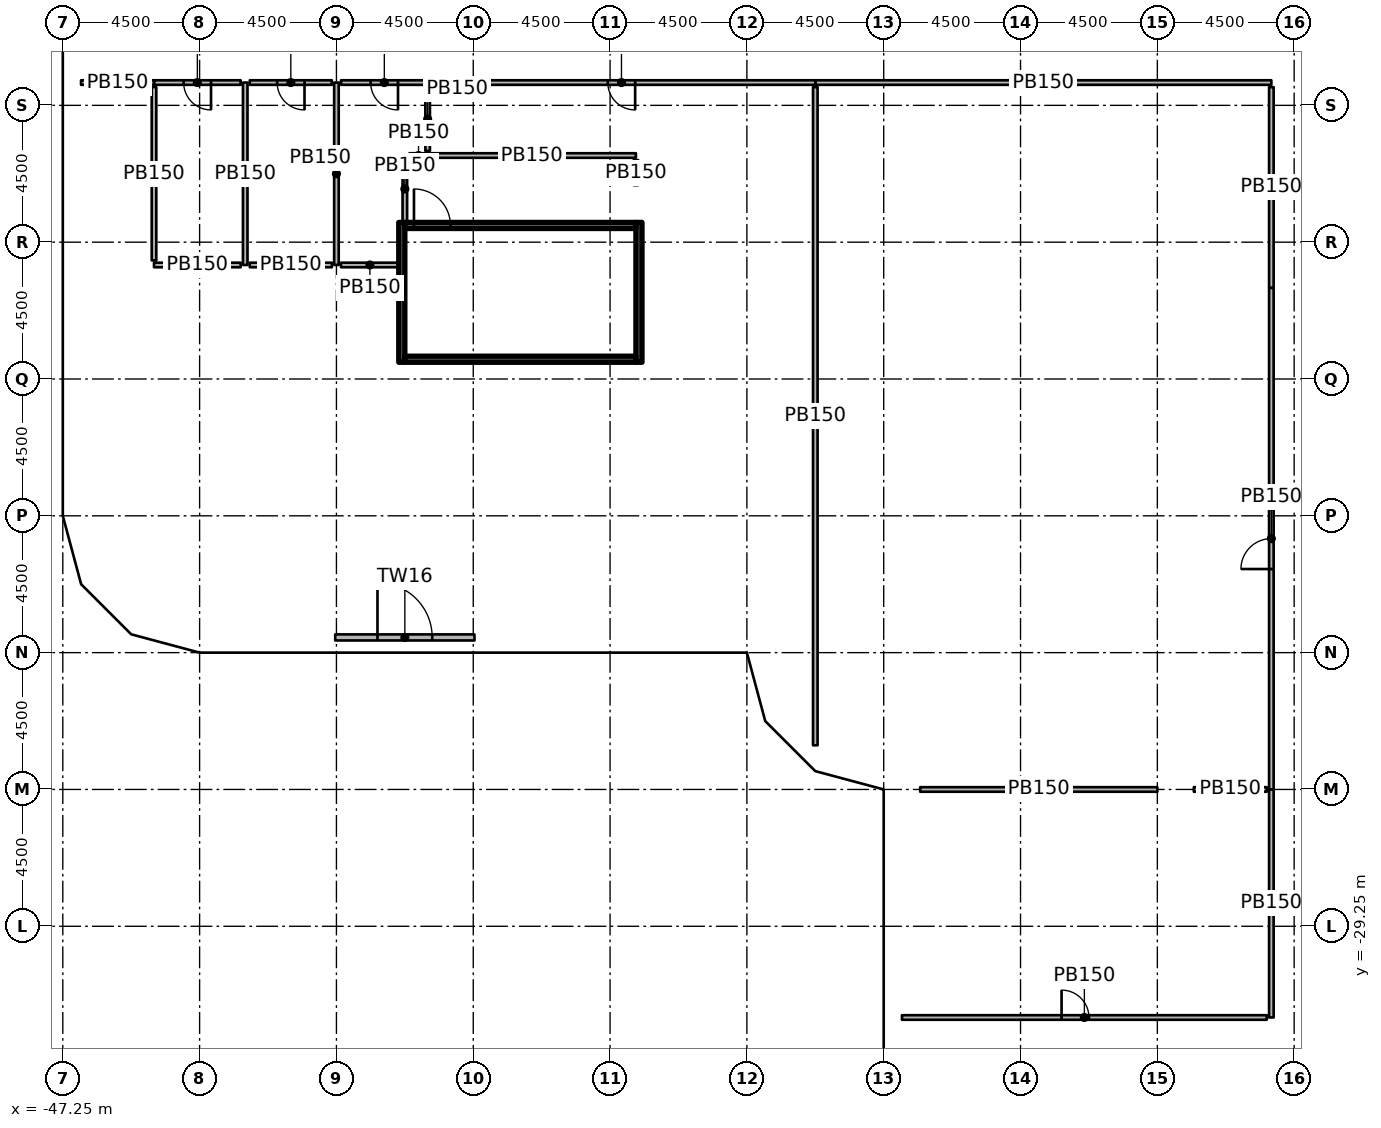
"""IFC4 building model, lengths in metres.
Left out: names, types, materials, properties, quantities, classifications, styles, units other than length and angle.
Written with IfcOpenShell. Run it as: python <this file> out.ifc"""

import sys

from ifc_helpers import new_model, si_unit, direction, frame, frame_2d, origin, origin_2d, place, context, subcontext, project, spatial, rectangle, extrude, element, fill, save


model = new_model("IFC4")
c1 = context("Model", 3, precision=1e-05, world=origin(), true_north=direction((0.0, 1.0)))
c2 = subcontext(c1, "Body", "Model", "MODEL_VIEW")
j1 = project(units=[si_unit("LENGTHUNIT", "METRE"), si_unit("PLANEANGLEUNIT", "RADIAN")], contexts=[c1])
p1 = place(None, origin())
s1 = spatial("IfcSite", under=j1, at=p1, CompositionType="ELEMENT")
p2 = place(p1, origin())
s2 = spatial("IfcBuilding", under=s1, at=p2, CompositionType="ELEMENT")
p3 = place(p2, frame((0.0, 0.0, 12.0)))
s3 = spatial("IfcBuildingStorey", under=s2, at=p3, CompositionType="ELEMENT", Elevation=12.0)
for number, where, z_axis, x_axis in (
    (1, (-46.47, -15.75, 0.0), (0.0, 0.0, 1.0), (1.0, 0.0, 0.0)),
    (2, (-46.65, -2.25, 0.0), (0.0, 0.0, 1.0), (1.0, 0.0, 0.0)),
    (3, (-42.75, -19.47, 0.0), (0.0, 0.0, 1.0), (1.0, 0.0, 0.0)),
    (4, (-33.75, -15.15, 0.0), (0.0, 0.0, 1.0), (1.0, 0.0, 0.0)),
    (5, (-33.11, -2.25, 0.0), (0.0, 0.0, 1.0), (1.0, 0.0, 0.0)),
    (6, (-29.25, -19.65, 0.0), (0.0, 0.0, 1.0), (1.0, 0.0, 0.0)),
    (7, (-28.908, -5.475, 0.0), (0.0, 0.0, 1.0), (1.0, 0.0, 0.0)),
    (8, (-24.15, -19.65, 0.0), (0.0, 0.0, 1.0), (1.0, 0.0, 0.0)),
    (9, (-24.75, -10.65, 0.0), (0.0, 0.0, 1.0), (1.0, 0.0, 0.0)),
    (10, (-24.75, -6.25, 0.0), (0.0, 0.0, 1.0), (1.0, 0.0, 0.0)),
    (11, (-19.65, -29.25, 0.0), (0.0, 0.0, 1.0), (1.0, 0.0, 0.0)),
    (12, (-19.65, -24.15, 0.0), (0.0, 0.0, 1.0), (1.0, 0.0, 0.0)),
    (13, (-19.65, -15.15, 0.0), (0.0, 0.0, 1.0), (1.0, 0.0, 0.0)),
    (14, (-20.25, -6.11, 0.0), (0.0, 0.0, 1.0), (1.0, 0.0, 0.0)),
    (15, (-15.15, -33.75, 0.0), (0.0, 0.0, 1.0), (1.0, 0.0, 0.0)),
    (16, (-15.15, -19.65, 0.0), (0.0, 0.0, 1.0), (1.0, 0.0, 0.0)),
    (17, (-15.15, -10.65, 0.0), (0.0, 0.0, 1.0), (1.0, 0.0, 0.0)),
    (18, (-15.75, -6.25, 0.0), (0.0, 0.0, 1.0), (1.0, 0.0, 0.0)),
    (19, (-10.65, -24.75, 0.0), (0.0, 0.0, 1.0), (1.0, 0.0, 0.0)),
    (20, (-10.65, -15.15, 0.0), (0.0, 0.0, 1.0), (1.0, 0.0, 0.0)),
    (21, (-10.75, -6.25, 0.0), (0.0, 0.0, 1.0), (1.0, 0.0, 0.0)),
    (22, (-6.25, -26.9, 0.0), (0.0, 0.0, 1.0), (1.0, 0.0, 0.0)),
    (23, (-6.25, -24.65, 0.0), (0.0, 0.0, 1.0), (1.0, 0.0, 0.0)),
    (24, (-6.25, -20.25, 0.0), (0.0, 0.0, 1.0), (1.0, 0.0, 0.0)),
    (25, (-6.25, -15.75, 0.0), (0.0, 0.0, 1.0), (1.0, 0.0, 0.0)),
    (26, (-6.25, -10.75, 0.0), (0.0, 0.0, 1.0), (1.0, 0.0, 0.0)),
    (27, (-6.25, -6.25, 0.0), (0.0, 0.0, 1.0), (1.0, 0.0, 0.0)),
):
    element("IfcColumn", number, at=place(p3, frame(where, z_axis=z_axis, x_axis=x_axis)), inside=s3, PredefinedType="COLUMN", context=c2, shape_type="SweptSolid", body=[
        extrude(rectangle(XDim=1.2, YDim=1.2, at=origin_2d()), origin(), (0.0, 0.0, 1.0), 4.55),
    ])
p4 = place(p3, frame((-38.29, -19.75, 0.0), z_axis=(0.0, 0.0, 1.0), x_axis=(1.0, 0.0, 0.0)))
e28 = element("IfcWall", 28, at=p4, inside=s3, PredefinedType="SOLIDWALL", context=c2, shape_type="SweptSolid", body=[
    extrude(rectangle(XDim=4.58, YDim=0.2, at=frame_2d((2.29, 0.0))), origin(), (0.0, 0.0, 1.0), 4.55),
])
p5 = place(p4, frame((1.39, 0.0, 0.0)))
e29 = element("IfcOpeningElement", 29, at=p5, cuts=e28, PredefinedType="OPENING", context=c2, shape_type="SweptSolid", body=[
    extrude(rectangle(XDim=1.8, YDim=2.4, at=frame_2d((0.9, 1.2))), frame((0.0, 0.11, 0.0), z_axis=(0.0, -1.0, 0.0), x_axis=(1.0, 0.0, 0.0)), (0.0, 0.0, 1.0), 0.22),
])
for number, where, z_axis, x_axis in (
    (30, (-36.1, -10.7, 0.0), (0.0, 0.0, 1.0), (0.0, 1.0, 0.0)),
    (31, (-28.3, -10.7, 0.0), (0.0, 0.0, 1.0), (0.0, 1.0, 0.0)),
):
    element("IfcWall", number, at=place(p3, frame(where, z_axis=z_axis, x_axis=x_axis)), inside=s3, PredefinedType="SHEAR", context=c2, shape_type="SweptSolid", body=[
        extrude(rectangle(XDim=4.6, YDim=0.2, at=frame_2d((2.3, 0.0))), origin(), (0.0, 0.0, 1.0), 4.55),
    ])
p6 = place(p3, frame((-36.0, -10.6, 0.0), z_axis=(0.0, 0.0, 1.0), x_axis=(1.0, 0.0, 0.0)))
e32 = element("IfcWall", 32, at=p6, inside=s3, PredefinedType="SHEAR", context=c2, shape_type="SweptSolid", body=[
    extrude(rectangle(XDim=7.6, YDim=0.2, at=frame_2d((3.8, 0.0))), origin(), (0.0, 0.0, 1.0), 4.55),
])
p7 = place(p3, frame((-36.0, -6.2, 0.0), z_axis=(0.0, 0.0, 1.0), x_axis=(1.0, 0.0, 0.0)))
e33 = element("IfcWall", 33, at=p7, inside=s3, PredefinedType="SHEAR", context=c2, shape_type="SweptSolid", body=[
    extrude(rectangle(XDim=7.6, YDim=0.2, at=frame_2d((3.8, 0.0))), origin(), (0.0, 0.0, 1.0), 4.55),
])
p8 = place(p7, frame((0.3, 0.0, 0.0)))
e34 = element("IfcOpeningElement", 34, at=p8, cuts=e33, PredefinedType="OPENING", context=c2, shape_type="SweptSolid", body=[
    extrude(rectangle(XDim=1.2, YDim=2.1, at=frame_2d((0.6, 1.05))), frame((0.0, 0.11, 0.0), z_axis=(0.0, -1.0, 0.0), x_axis=(1.0, 0.0, 0.0)), (0.0, 0.0, 1.0), 0.22),
])
p9 = place(p3, frame((-36.0, -6.1, 0.0), z_axis=(0.0, 0.0, 1.0), x_axis=(0.0, 1.0, 0.0)))
e35 = element("IfcWall", 35, at=p9, inside=s3, PredefinedType="PARTITIONING", context=c2, shape_type="SweptSolid", body=[
    extrude(rectangle(XDim=2.2, YDim=0.15, at=frame_2d((1.1, 0.0))), origin(), (0.0, 0.0, 1.0), 4.55),
])
p10 = place(p3, frame((-35.85, -3.9, 0.0), z_axis=(0.0, 0.0, 1.0), x_axis=(1.0, 0.0, 0.0)))
e36 = element("IfcWall", 36, at=p10, inside=s3, PredefinedType="PARTITIONING", context=c2, shape_type="SweptSolid", body=[
    extrude(rectangle(XDim=0.6, YDim=0.15, at=frame_2d((0.3, 0.0))), origin(), (0.0, 0.0, 1.0), 4.55),
])
p11 = place(p3, frame((-35.25, -3.9, 0.0), z_axis=(0.0, 0.0, 1.0), x_axis=(1.0, 0.0, 0.0)))
e37 = element("IfcWall", 37, at=p11, inside=s3, PredefinedType="PARTITIONING", context=c2, shape_type="SweptSolid", body=[
    extrude(rectangle(XDim=6.85, YDim=0.15, at=frame_2d((3.425, 0.0))), origin(), (0.0, 0.0, 1.0), 4.55),
])
p12 = place(p3, frame((-28.4, -4.05, 0.0), z_axis=(0.0, 0.0, 1.0), x_axis=(0.0, -1.0, 0.0)))
e38 = element("IfcWall", 38, at=p12, inside=s3, PredefinedType="PARTITIONING", context=c2, shape_type="SweptSolid", body=[
    extrude(rectangle(XDim=0.825, YDim=0.15, at=frame_2d((0.413, 0.0))), origin(), (0.0, 0.0, 1.0), 4.55),
])
p13 = place(p3, frame((-41.25, -1.5, 0.0), z_axis=(0.0, 0.0, 1.0), x_axis=(0.0, -1.0, 0.0)))
e39 = element("IfcWall", 39, at=p13, inside=s3, PredefinedType="PARTITIONING", context=c2, shape_type="SweptSolid", body=[
    extrude(rectangle(XDim=6.0, YDim=0.15, at=frame_2d((3.0, 0.0))), origin(), (0.0, 0.0, 1.0), 4.55),
])
p14 = place(p3, frame((-41.4, -1.5, 0.0), z_axis=(0.0, 0.0, 1.0), x_axis=(-1.0, 0.0, 0.0)))
e40 = element("IfcWall", 40, at=p14, inside=s3, PredefinedType="PARTITIONING", context=c2, shape_type="SweptSolid", body=[
    extrude(rectangle(XDim=2.85, YDim=0.15, at=frame_2d((1.425, 0.0))), origin(), (0.0, 0.0, 1.0), 4.55),
])
p15 = place(p14, frame((0.975, 0.0, 0.0)))
e41 = element("IfcOpeningElement", 41, at=p15, cuts=e40, PredefinedType="OPENING", context=c2, shape_type="SweptSolid", body=[
    extrude(rectangle(XDim=0.9, YDim=2.1, at=frame_2d((0.45, 1.05))), frame((0.0, 0.085, 0.0), z_axis=(0.0, -1.0, 0.0), x_axis=(1.0, 0.0, 0.0)), (0.0, 0.0, 1.0), 0.17),
])
p16 = place(p3, frame((-41.4, -7.5, 0.0), z_axis=(0.0, 0.0, 1.0), x_axis=(-1.0, 0.0, 0.0)))
e42 = element("IfcWall", 42, at=p16, inside=s3, PredefinedType="PARTITIONING", context=c2, shape_type="SweptSolid", body=[
    extrude(rectangle(XDim=2.85, YDim=0.15, at=frame_2d((1.425, 0.0))), origin(), (0.0, 0.0, 1.0), 4.55),
])
p17 = place(p3, frame((-44.25, -7.35, 0.0), z_axis=(0.0, 0.0, 1.0), x_axis=(0.0, 1.0, 0.0)))
e43 = element("IfcWall", 43, at=p17, inside=s3, PredefinedType="PARTITIONING", context=c2, shape_type="SweptSolid", body=[
    extrude(rectangle(XDim=5.7, YDim=0.15, at=frame_2d((2.85, 0.0))), origin(), (0.0, 0.0, 1.0), 4.55),
])
p18 = place(p3, frame((-38.25, -1.5, 0.0), z_axis=(0.0, 0.0, 1.0), x_axis=(0.0, -1.0, 0.0)))
e44 = element("IfcWall", 44, at=p18, inside=s3, PredefinedType="PARTITIONING", context=c2, shape_type="SweptSolid", body=[
    extrude(rectangle(XDim=6.0, YDim=0.15, at=frame_2d((3.0, 0.0))), origin(), (0.0, 0.0, 1.0), 4.55),
])
p19 = place(p3, frame((-38.4, -1.5, 0.0), z_axis=(0.0, 0.0, 1.0), x_axis=(-1.0, 0.0, 0.0)))
e45 = element("IfcWall", 45, at=p19, inside=s3, PredefinedType="PARTITIONING", context=c2, shape_type="SweptSolid", body=[
    extrude(rectangle(XDim=2.7, YDim=0.15, at=frame_2d((1.35, 0.0))), origin(), (0.0, 0.0, 1.0), 4.55),
])
p20 = place(p19, frame((0.9, 0.0, 0.0)))
e46 = element("IfcOpeningElement", 46, at=p20, cuts=e45, PredefinedType="OPENING", context=c2, shape_type="SweptSolid", body=[
    extrude(rectangle(XDim=0.9, YDim=2.1, at=frame_2d((0.45, 1.05))), frame((0.0, 0.085, 0.0), z_axis=(0.0, -1.0, 0.0), x_axis=(1.0, 0.0, 0.0)), (0.0, 0.0, 1.0), 0.17),
])
p21 = place(p3, frame((-38.4, -7.5, 0.0), z_axis=(0.0, 0.0, 1.0), x_axis=(-1.0, 0.0, 0.0)))
e47 = element("IfcWall", 47, at=p21, inside=s3, PredefinedType="PARTITIONING", context=c2, shape_type="SweptSolid", body=[
    extrude(rectangle(XDim=2.7, YDim=0.15, at=frame_2d((1.35, 0.0))), origin(), (0.0, 0.0, 1.0), 4.55),
])
p22 = place(p3, frame((-35.25, -1.5, 0.0), z_axis=(0.0, 0.0, 1.0), x_axis=(-1.0, 0.0, 0.0)))
e48 = element("IfcWall", 48, at=p22, inside=s3, PredefinedType="PARTITIONING", context=c2, shape_type="SweptSolid", body=[
    extrude(rectangle(XDim=2.85, YDim=0.15, at=frame_2d((1.425, 0.0))), origin(), (0.0, 0.0, 1.0), 4.55),
])
p23 = place(p22, frame((0.975, 0.0, 0.0)))
e49 = element("IfcOpeningElement", 49, at=p23, cuts=e48, PredefinedType="OPENING", context=c2, shape_type="SweptSolid", body=[
    extrude(rectangle(XDim=0.9, YDim=2.1, at=frame_2d((0.45, 1.05))), frame((0.0, 0.085, 0.0), z_axis=(0.0, -1.0, 0.0), x_axis=(1.0, 0.0, 0.0)), (0.0, 0.0, 1.0), 0.17),
])
p24 = place(p3, frame((-36.2, -7.5, 0.0), z_axis=(0.0, 0.0, 1.0), x_axis=(-1.0, 0.0, 0.0)))
e50 = element("IfcWall", 50, at=p24, inside=s3, PredefinedType="PARTITIONING", context=c2, shape_type="SweptSolid", body=[
    extrude(rectangle(XDim=1.9, YDim=0.15, at=frame_2d((0.95, 0.0))), origin(), (0.0, 0.0, 1.0), 4.55),
])
p25 = place(p3, frame((-35.25, -1.65, 0.0), z_axis=(0.0, 0.0, 1.0), x_axis=(0.0, -1.0, 0.0)))
e51 = element("IfcWall", 51, at=p25, inside=s3, PredefinedType="PARTITIONING", context=c2, shape_type="SweptSolid", body=[
    extrude(rectangle(XDim=2.1, YDim=0.15, at=frame_2d((1.05, 0.0))), origin(), (0.0, 0.0, 1.0), 4.55),
])
p26 = place(p3, frame((-7.5, -24.75, 0.0), z_axis=(0.0, 0.0, 1.0), x_axis=(0.0, 1.0, 0.0)))
e52 = element("IfcWall", 52, at=p26, inside=s3, PredefinedType="PARTITIONING", context=c2, shape_type="SweptSolid", body=[
    extrude(rectangle(XDim=16.5, YDim=0.15, at=frame_2d((8.25, 0.0))), origin(), (0.0, 0.0, 1.0), 4.55),
])
p27 = place(p26, frame((7.25, 0.0, 0.0)))
e53 = element("IfcOpeningElement", 53, at=p27, cuts=e52, PredefinedType="OPENING", context=c2, shape_type="SweptSolid", body=[
    extrude(rectangle(XDim=1.0, YDim=2.1, at=frame_2d((0.5, 1.05))), frame((0.0, 0.085, 0.0), z_axis=(0.0, -1.0, 0.0), x_axis=(1.0, 0.0, 0.0)), (0.0, 0.0, 1.0), 0.17),
])
p28 = place(p3, frame((-7.5, -32.25, 0.0), z_axis=(0.0, 0.0, 1.0), x_axis=(0.0, 1.0, 0.0)))
e54 = element("IfcWall", 54, at=p28, inside=s3, PredefinedType="PARTITIONING", context=c2, shape_type="SweptSolid", body=[
    extrude(rectangle(XDim=7.5, YDim=0.15, at=frame_2d((3.75, 0.0))), origin(), (0.0, 0.0, 1.0), 4.55),
])
p29 = place(p3, frame((-7.5, -1.5, 0.0), z_axis=(0.0, 0.0, 1.0), x_axis=(-1.0, 0.0, 0.0)))
e55 = element("IfcWall", 55, at=p29, inside=s3, PredefinedType="PARTITIONING", context=c2, shape_type="SweptSolid", body=[
    extrude(rectangle(XDim=15.0, YDim=0.15, at=frame_2d((7.5, 0.0))), origin(), (0.0, 0.0, 1.0), 4.55),
])
p30 = place(p3, frame((-44.25, -1.5, 0.0), z_axis=(0.0, 0.0, 1.0), x_axis=(-1.0, 0.0, 0.0)))
e56 = element("IfcWall", 56, at=p30, inside=s3, PredefinedType="PARTITIONING", context=c2, shape_type="SweptSolid", body=[
    extrude(rectangle(XDim=2.4, YDim=0.15, at=frame_2d((1.2, 0.0))), origin(), (0.0, 0.0, 1.0), 4.55),
])
p31 = place(p3, frame((-22.5, -1.5, 0.0), z_axis=(0.0, 0.0, 1.0), x_axis=(-1.0, 0.0, 0.0)))
e57 = element("IfcWall", 57, at=p31, inside=s3, PredefinedType="PARTITIONING", context=c2, shape_type="SweptSolid", body=[
    extrude(rectangle(XDim=12.75, YDim=0.15, at=frame_2d((6.375, 0.0))), origin(), (0.0, 0.0, 1.0), 4.55),
])
p32 = place(p31, frame((5.925, 0.0, 0.0)))
e58 = element("IfcOpeningElement", 58, at=p32, cuts=e57, PredefinedType="OPENING", context=c2, shape_type="SweptSolid", body=[
    extrude(rectangle(XDim=0.9, YDim=2.1, at=frame_2d((0.45, 1.05))), frame((0.0, 0.085, 0.0), z_axis=(0.0, -1.0, 0.0), x_axis=(1.0, 0.0, 0.0)), (0.0, 0.0, 1.0), 0.17),
])
p33 = place(p3, frame((-22.5, -23.297, 0.0), z_axis=(0.0, 0.0, 1.0), x_axis=(0.0, 1.0, 0.0)))
e59 = element("IfcWall", 59, at=p33, inside=s3, PredefinedType="PARTITIONING", context=c2, shape_type="SweptSolid", body=[
    extrude(rectangle(XDim=21.647, YDim=0.15, at=frame_2d((10.824, 0.0))), origin(), (0.0, 0.0, 1.0), 4.55),
])
p34 = place(p3, frame((-7.65, -24.75, 0.0), z_axis=(0.0, 0.0, 1.0), x_axis=(-1.0, 0.0, 0.0)))
e60 = element("IfcWall", 60, at=p34, inside=s3, PredefinedType="PARTITIONING", context=c2, shape_type="SweptSolid", body=[
    extrude(rectangle(XDim=2.4, YDim=0.15, at=frame_2d((1.2, 0.0))), origin(), (0.0, 0.0, 1.0), 4.55),
])
p35 = place(p3, frame((-11.25, -24.75, 0.0), z_axis=(0.0, 0.0, 1.0), x_axis=(-1.0, 0.0, 0.0)))
e61 = element("IfcWall", 61, at=p35, inside=s3, PredefinedType="PARTITIONING", context=c2, shape_type="SweptSolid", body=[
    extrude(rectangle(XDim=7.8, YDim=0.15, at=frame_2d((3.9, 0.0))), origin(), (0.0, 0.0, 1.0), 4.55),
])
p36 = place(p3, frame((-7.5, -1.65, 0.0), z_axis=(0.0, 0.0, 1.0), x_axis=(0.0, -1.0, 0.0)))
e62 = element("IfcWall", 62, at=p36, inside=s3, PredefinedType="PARTITIONING", context=c2, shape_type="SweptSolid", body=[
    extrude(rectangle(XDim=6.6, YDim=0.15, at=frame_2d((3.3, 0.0))), origin(), (0.0, 0.0, 1.0), 4.55),
])
p37 = place(p3, frame((-19.65, -32.25, 0.0), z_axis=(0.0, 0.0, 1.0), x_axis=(1.0, 0.0, 0.0)))
e63 = element("IfcWall", 63, at=p37, inside=s3, PredefinedType="PARTITIONING", context=c2, shape_type="SweptSolid", body=[
    extrude(rectangle(XDim=12.0, YDim=0.15, at=frame_2d((6.0, 0.0))), origin(), (0.0, 0.0, 1.0), 4.55),
])
p38 = place(p37, frame((5.25, 0.0, 0.0)))
e64 = element("IfcOpeningElement", 64, at=p38, cuts=e63, PredefinedType="OPENING", context=c2, shape_type="SweptSolid", body=[
    extrude(rectangle(XDim=0.9, YDim=2.1, at=frame_2d((0.45, 1.05))), frame((0.0, 0.085, 0.0), z_axis=(0.0, -1.0, 0.0), x_axis=(1.0, 0.0, 0.0)), (0.0, 0.0, 1.0), 0.17),
])
p39 = place(p5, origin())
e65 = element("IfcDoor", 65, at=p39, inside=s3, OperationType="SINGLE_SWING_LEFT", PredefinedType="DOOR", context=c2, shape_type="SweptSolid", body=[
    extrude(rectangle(XDim=1.8, YDim=2.4, at=frame_2d((0.9, 1.2))), frame((0.0, 0.025, 0.0), z_axis=(0.0, -1.0, 0.0), x_axis=(1.0, 0.0, 0.0)), (0.0, 0.0, 1.0), 0.05),
])
fill(e29, e65)
p40 = place(p8, origin())
e66 = element("IfcDoor", 66, at=p40, inside=s3, OperationType="SINGLE_SWING_RIGHT", PredefinedType="DOOR", context=c2, shape_type="SweptSolid", body=[
    extrude(rectangle(XDim=1.2, YDim=2.1, at=frame_2d((0.6, 1.05))), frame((0.0, 0.025, 0.0), z_axis=(0.0, -1.0, 0.0), x_axis=(1.0, 0.0, 0.0)), (0.0, 0.0, 1.0), 0.05),
])
fill(e34, e66)
p41 = place(p15, origin())
e67 = element("IfcDoor", 67, at=p41, inside=s3, OperationType="SINGLE_SWING_LEFT", PredefinedType="DOOR", context=c2, shape_type="SweptSolid", body=[
    extrude(rectangle(XDim=0.9, YDim=2.1, at=frame_2d((0.45, 1.05))), frame((0.0, 0.025, 0.0), z_axis=(0.0, -1.0, 0.0), x_axis=(1.0, 0.0, 0.0)), (0.0, 0.0, 1.0), 0.05),
])
fill(e41, e67)
p42 = place(p20, origin())
e68 = element("IfcDoor", 68, at=p42, inside=s3, OperationType="SINGLE_SWING_LEFT", PredefinedType="DOOR", context=c2, shape_type="SweptSolid", body=[
    extrude(rectangle(XDim=0.9, YDim=2.1, at=frame_2d((0.45, 1.05))), frame((0.0, 0.025, 0.0), z_axis=(0.0, -1.0, 0.0), x_axis=(1.0, 0.0, 0.0)), (0.0, 0.0, 1.0), 0.05),
])
fill(e46, e68)
p43 = place(p23, origin())
e69 = element("IfcDoor", 69, at=p43, inside=s3, OperationType="SINGLE_SWING_LEFT", PredefinedType="DOOR", context=c2, shape_type="SweptSolid", body=[
    extrude(rectangle(XDim=0.9, YDim=2.1, at=frame_2d((0.45, 1.05))), frame((0.0, 0.025, 0.0), z_axis=(0.0, -1.0, 0.0), x_axis=(1.0, 0.0, 0.0)), (0.0, 0.0, 1.0), 0.05),
])
fill(e49, e69)
p44 = place(p27, origin())
e70 = element("IfcDoor", 70, at=p44, inside=s3, OperationType="SINGLE_SWING_LEFT", PredefinedType="DOOR", context=c2, shape_type="SweptSolid", body=[
    extrude(rectangle(XDim=1.0, YDim=2.1, at=frame_2d((0.5, 1.05))), frame((0.0, 0.025, 0.0), z_axis=(0.0, -1.0, 0.0), x_axis=(1.0, 0.0, 0.0)), (0.0, 0.0, 1.0), 0.05),
])
fill(e53, e70)
p45 = place(p32, origin())
e71 = element("IfcDoor", 71, at=p45, inside=s3, OperationType="SINGLE_SWING_LEFT", PredefinedType="DOOR", context=c2, shape_type="SweptSolid", body=[
    extrude(rectangle(XDim=0.9, YDim=2.1, at=frame_2d((0.45, 1.05))), frame((0.0, 0.025, 0.0), z_axis=(0.0, -1.0, 0.0), x_axis=(1.0, 0.0, 0.0)), (0.0, 0.0, 1.0), 0.05),
])
fill(e58, e71)
p46 = place(p38, origin())
e72 = element("IfcDoor", 72, at=p46, inside=s3, OperationType="SINGLE_SWING_LEFT", PredefinedType="DOOR", context=c2, shape_type="SweptSolid", body=[
    extrude(rectangle(XDim=0.9, YDim=2.1, at=frame_2d((0.45, 1.05))), frame((0.0, 0.025, 0.0), z_axis=(0.0, -1.0, 0.0), x_axis=(1.0, 0.0, 0.0)), (0.0, 0.0, 1.0), 0.05),
])
fill(e64, e72)
save(model, sys.argv[1])
